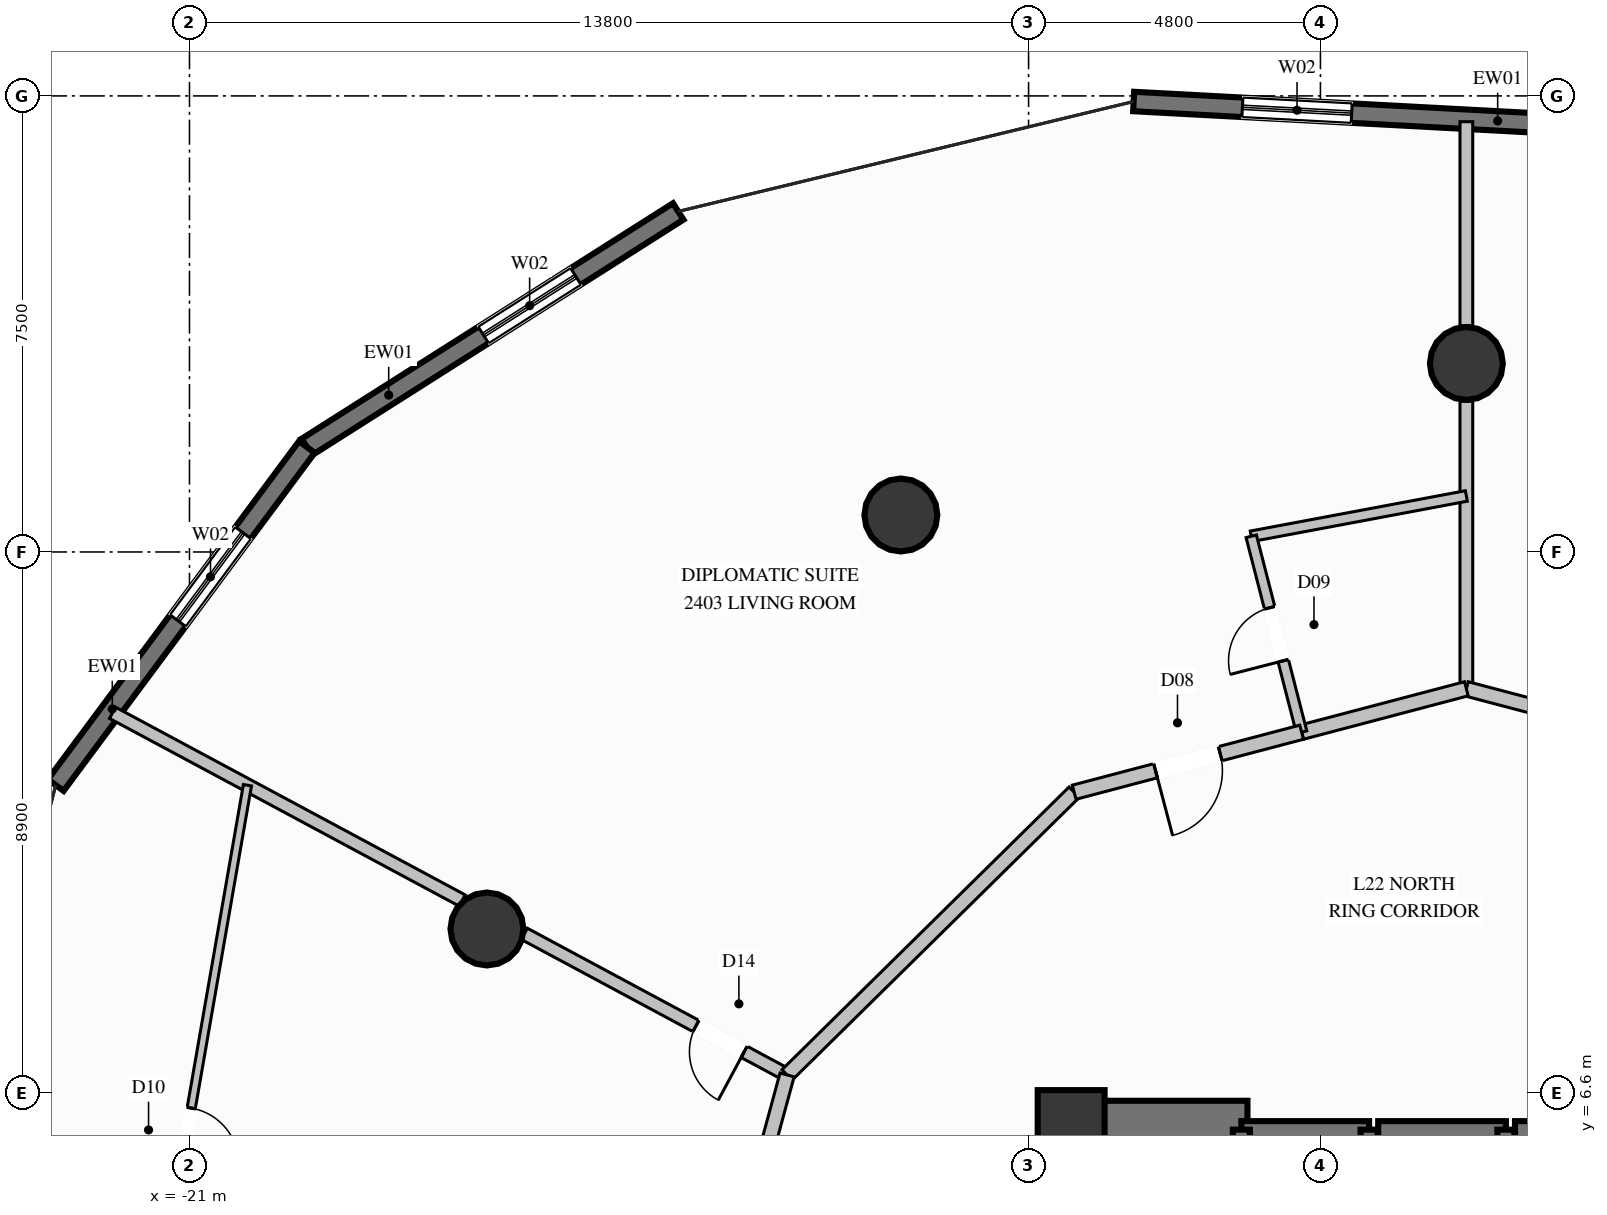
"""IFC4 building model, lengths in metres.
Left out: names, types, materials, properties, quantities, classifications, styles, units other than length and angle.
Written with IfcOpenShell. Run it as: python <this file> out.ifc"""

import sys

from ifc_helpers import new_model, si_unit, direction, frame, frame_2d, origin, origin_2d, place, context, subcontext, project, spatial, rectangle, circle, extrude, element, fill, save


model = new_model("IFC4")
c1 = context("Model", 3, precision=1e-05, world=origin(), true_north=direction((0.0, 1.0)))
c2 = subcontext(c1, "Body", "Model", "MODEL_VIEW")
j1 = project(units=[si_unit("LENGTHUNIT", "METRE"), si_unit("PLANEANGLEUNIT", "RADIAN")], contexts=[c1])
p1 = place(None, origin())
s1 = spatial("IfcSite", under=j1, at=p1, CompositionType="ELEMENT")
p2 = place(p1, origin())
s2 = spatial("IfcBuilding", under=s1, at=p2, CompositionType="ELEMENT")
p3 = place(p2, frame((0.0, 0.0, 89.6)))
s3 = spatial("IfcBuildingStorey", under=s2, at=p3, CompositionType="ELEMENT", Elevation=89.6)
p4 = place(p3, frame((-6.5, 6.1, 0.0), z_axis=(0.0, 0.0, 1.0), x_axis=(1.0, 0.0, 0.0)))
e1 = element("IfcColumn", 1, at=p4, inside=s3, PredefinedType="COLUMN", context=c2, shape_type="SweptSolid", body=[
    extrude(rectangle(XDim=1.1, YDim=1.1, at=origin_2d()), origin(), (0.0, 0.0, 1.0), 3.6),
])
p5 = place(p3, frame((-6.125, 6.1, 0.0), z_axis=(0.0, 0.0, 1.0), x_axis=(1.0, 0.0, 0.0)))
e2 = element("IfcWall", 2, at=p5, inside=s3, PredefinedType="SHEAR", context=c2, shape_type="SweptSolid", body=[
    extrude(rectangle(XDim=2.525, YDim=0.75, at=frame_2d((1.262, 0.0))), origin(), (0.0, 0.0, 1.0), 3.6),
])
p6 = place(p3, frame((-6.5, 2.35, 0.0), z_axis=(0.0, 0.0, 1.0), x_axis=(0.0, 1.0, 0.0)))
e3 = element("IfcWall", 3, at=p6, inside=s3, PredefinedType="SHEAR", context=c2, shape_type="SweptSolid", body=[
    extrude(rectangle(XDim=4.125, YDim=0.75, at=frame_2d((2.062, 0.0))), origin(), (0.0, 0.0, 1.0), 3.6),
])
for number, where, z_axis, x_axis in (
    (4, (0.0, 18.6, 0.0), (0.0, 0.0, 1.0), (1.0, 0.0, 0.0)),
    (5, (-9.3, 16.108, 0.0), (0.0, 0.0, 1.0), (1.0, 0.0, 0.0)),
    (6, (-16.108, 9.3, 0.0), (0.0, 0.0, 1.0), (1.0, 0.0, 0.0)),
):
    element("IfcColumn", number, at=place(p3, frame(where, z_axis=z_axis, x_axis=x_axis)), inside=s3, PredefinedType="COLUMN", context=c2, shape_type="SweptSolid", body=[
        extrude(circle(Radius=0.6, at=origin_2d()), origin(), (0.0, 0.0, 1.0), 3.6),
    ])
p7 = place(p3, frame((-5.472, 22.908, 0.0), z_axis=(0.0, 0.0, 1.0), x_axis=(0.998582015263, -0.053234939583, 0.0)))
e7 = element("IfcWall", 7, at=p7, inside=s3, PredefinedType="SOLIDWALL", context=c2, shape_type="SweptSolid", body=[
    extrude(rectangle(XDim=8.149, YDim=0.32, at=frame_2d((4.075, 0.0))), origin(), (0.0, 0.0, 1.0), 3.2),
])
p8 = place(p7, frame((1.791, 0.0, 0.35)))
e8 = element("IfcOpeningElement", 8, at=p8, cuts=e7, PredefinedType="OPENING", context=c2, shape_type="SweptSolid", body=[
    extrude(rectangle(XDim=1.8, YDim=2.6, at=frame_2d((0.9, 1.3))), frame((0.0, 0.17, 0.0), z_axis=(0.0, -1.0, 0.0), x_axis=(1.0, 0.0, 0.0)), (0.0, 0.0, 1.0), 0.34),
])
p9 = place(p3, frame((-19.07, 17.226, 0.0), z_axis=(0.0, 0.0, 1.0), x_axis=(0.844473577477, 0.535597215213, 0.0)))
e9 = element("IfcWall", 9, at=p9, inside=s3, PredefinedType="SOLIDWALL", context=c2, shape_type="SweptSolid", body=[
    extrude(rectangle(XDim=7.233, YDim=0.32, at=frame_2d((3.617, 0.0))), origin(), (0.0, 0.0, 1.0), 3.2),
])
p10 = place(p9, frame((3.439, 0.0, 0.35)))
e10 = element("IfcOpeningElement", 10, at=p10, cuts=e9, PredefinedType="OPENING", context=c2, shape_type="SweptSolid", body=[
    extrude(rectangle(XDim=1.8, YDim=2.6, at=frame_2d((0.9, 1.3))), frame((0.0, 0.17, 0.0), z_axis=(0.0, -1.0, 0.0), x_axis=(1.0, 0.0, 0.0)), (0.0, 0.0, 1.0), 0.34),
])
p11 = place(p3, frame((-23.199, 11.666, 0.0), z_axis=(0.0, 0.0, 1.0), x_axis=(0.596191587438, 0.80284219562, 0.0)))
e11 = element("IfcWall", 11, at=p11, inside=s3, PredefinedType="SOLIDWALL", context=c2, shape_type="SweptSolid", body=[
    extrude(rectangle(XDim=6.926, YDim=0.32, at=frame_2d((3.463, 0.0))), origin(), (0.0, 0.0, 1.0), 3.2),
])
p12 = place(p11, frame((3.368, 0.0, 0.35)))
e12 = element("IfcOpeningElement", 12, at=p12, cuts=e11, PredefinedType="OPENING", context=c2, shape_type="SweptSolid", body=[
    extrude(rectangle(XDim=1.8, YDim=2.6, at=frame_2d((0.9, 1.3))), frame((0.0, 0.17, 0.0), z_axis=(0.0, -1.0, 0.0), x_axis=(1.0, 0.0, 0.0)), (0.0, 0.0, 1.0), 0.34),
])
p13 = place(p3, frame((-1.6, 6.0, 0.0), z_axis=(0.0, 0.0, 1.0), x_axis=(-1.0, 0.0, 0.0)))
e13 = element("IfcWall", 13, at=p13, inside=s3, PredefinedType="SOLIDWALL", context=c2, shape_type="SweptSolid", body=[
    extrude(rectangle(XDim=2.1, YDim=0.28, at=frame_2d((1.05, 0.0))), origin(), (0.0, 0.0, 1.0), 3.2),
])
for number, where, z_axis, x_axis in (
    (14, (-3.7, 6.0, 0.0), (0.0, 0.0, 1.0), (0.0, -1.0, 0.0)),
    (15, (-1.6, 3.5, 0.0), (0.0, 0.0, 1.0), (0.0, 1.0, 0.0)),
):
    element("IfcWall", number, at=place(p3, frame(where, z_axis=z_axis, x_axis=x_axis)), inside=s3, PredefinedType="SOLIDWALL", context=c2, shape_type="SweptSolid", body=[
        extrude(rectangle(XDim=2.5, YDim=0.28, at=frame_2d((1.25, 0.0))), origin(), (0.0, 0.0, 1.0), 3.2),
    ])
p14 = place(p3, frame((0.65, 6.0, 0.0), z_axis=(0.0, 0.0, 1.0), x_axis=(-1.0, 0.0, 0.0)))
e16 = element("IfcWall", 16, at=p14, inside=s3, PredefinedType="SOLIDWALL", context=c2, shape_type="SweptSolid", body=[
    extrude(rectangle(XDim=2.1, YDim=0.28, at=frame_2d((1.05, 0.0))), origin(), (0.0, 0.0, 1.0), 3.2),
])
p15 = place(p3, frame((0.65, 3.5, 0.0), z_axis=(0.0, 0.0, 1.0), x_axis=(0.0, 1.0, 0.0)))
e17 = element("IfcWall", 17, at=p15, inside=s3, PredefinedType="SOLIDWALL", context=c2, shape_type="SweptSolid", body=[
    extrude(rectangle(XDim=2.5, YDim=0.28, at=frame_2d((1.25, 0.0))), origin(), (0.0, 0.0, 1.0), 3.2),
])
p16 = place(p3, frame((3.0, 6.0, 0.0), z_axis=(0.0, 0.0, 1.0), x_axis=(-1.0, 0.0, 0.0)))
e18 = element("IfcWall", 18, at=p16, inside=s3, PredefinedType="SOLIDWALL", context=c2, shape_type="SweptSolid", body=[
    extrude(rectangle(XDim=2.2, YDim=0.28, at=frame_2d((1.1, 0.0))), origin(), (0.0, 0.0, 1.0), 3.2),
])
p17 = place(p3, frame((0.0, 13.25, 0.0), z_axis=(0.0, 0.0, 1.0), x_axis=(0.0, 1.0, 0.0)))
e19 = element("IfcWall", 19, at=p17, inside=s3, PredefinedType="PARTITIONING", context=c2, shape_type="SweptSolid", body=[
    extrude(rectangle(XDim=4.73, YDim=0.21, at=frame_2d((2.365, 0.0))), origin(), (0.0, 0.0, 1.0), 2.067),
])
p18 = place(p3, frame((0.0, 19.22, 0.0), z_axis=(0.0, 0.0, 1.0), x_axis=(0.0, 1.0, 0.0)))
e20 = element("IfcWall", 20, at=p18, inside=s3, PredefinedType="PARTITIONING", context=c2, shape_type="SweptSolid", body=[
    extrude(rectangle(XDim=3.356, YDim=0.21, at=frame_2d((1.678, 0.0))), origin(), (0.0, 0.0, 1.0), 3.2),
])
p19 = place(p3, frame((-11.172, 6.9, 0.0), z_axis=(0.0, 0.0, 1.0), x_axis=(-0.881025167938, 0.473069396029, 0.0)))
e21 = element("IfcWall", 21, at=p19, inside=s3, PredefinedType="PARTITIONING", context=c2, shape_type="SweptSolid", body=[
    extrude(rectangle(XDim=4.904, YDim=0.21, at=frame_2d((2.452, 0.0))), origin(), (0.0, 0.0, 1.0), 2.067),
])
p20 = place(p19, frame((0.801, 0.0, 0.0)))
e22 = element("IfcOpeningElement", 22, at=p20, cuts=e21, PredefinedType="OPENING", context=c2, shape_type="SweptSolid", body=[
    extrude(rectangle(XDim=0.9, YDim=2.02, at=frame_2d((0.45, 1.01))), frame((0.0, 0.115, 0.0), z_axis=(0.0, -1.0, 0.0), x_axis=(1.0, 0.0, 0.0)), (0.0, 0.0, 1.0), 0.23),
])
p21 = place(p3, frame((-16.515, 9.768, 0.0), z_axis=(0.0, 0.0, 1.0), x_axis=(-0.881103250106, 0.472923950178, 0.0)))
e23 = element("IfcWall", 23, at=p21, inside=s3, PredefinedType="PARTITIONING", context=c2, shape_type="SweptSolid", body=[
    extrude(rectangle(XDim=6.527, YDim=0.21, at=frame_2d((3.264, 0.0))), origin(), (0.0, 0.0, 1.0), 3.2),
])
p22 = place(p3, frame((3.741, 12.263, 0.0), z_axis=(0.0, 0.0, 1.0), x_axis=(-0.966909222747, 0.255120667465, 0.0)))
e24 = element("IfcWall", 24, at=p22, inside=s3, PredefinedType="PARTITIONING", context=c2, shape_type="SweptSolid", body=[
    extrude(rectangle(XDim=3.869, YDim=0.24, at=frame_2d((1.935, 0.0))), origin(), (0.0, 0.0, 1.0), 3.2),
])
p23 = place(p22, frame((1.435, 0.0, 0.0)))
e25 = element("IfcOpeningElement", 25, at=p23, cuts=e24, PredefinedType="OPENING", context=c2, shape_type="SweptSolid", body=[
    extrude(rectangle(XDim=1.0, YDim=2.2, at=frame_2d((0.5, 1.1))), frame((0.0, 0.13, 0.0), z_axis=(0.0, -1.0, 0.0), x_axis=(1.0, 0.0, 0.0)), (0.0, 0.0, 1.0), 0.26),
])
p24 = place(p3, frame((0.0, 13.25, 0.0), z_axis=(0.0, 0.0, 1.0), x_axis=(-0.966967212689, -0.254900783806, 0.0)))
e26 = element("IfcWall", 26, at=p24, inside=s3, PredefinedType="PARTITIONING", context=c2, shape_type="SweptSolid", body=[
    extrude(rectangle(XDim=2.802, YDim=0.24, at=frame_2d((1.401, 0.0))), origin(), (0.0, 0.0, 1.0), 3.2),
])
p25 = place(p3, frame((0.0, 16.421, 0.0), z_axis=(0.0, 0.0, 1.0), x_axis=(-0.982899817201, -0.184141112593, 0.0)))
e27 = element("IfcWall", 27, at=p25, inside=s3, PredefinedType="PLUMBINGWALL", context=c2, shape_type="SweptSolid", body=[
    extrude(rectangle(XDim=3.6, YDim=0.175, at=frame_2d((1.8, 0.0))), origin(), (0.0, 0.0, 1.0), 3.2),
])
p26 = place(p3, frame((-2.709, 12.536, 0.0), z_axis=(0.0, 0.0, 1.0), x_axis=(-0.249194424237, 0.968453477938, 0.0)))
e28 = element("IfcWall", 28, at=p26, inside=s3, PredefinedType="PLUMBINGWALL", context=c2, shape_type="SweptSolid", body=[
    extrude(rectangle(XDim=3.327, YDim=0.175, at=frame_2d((1.664, 0.0))), origin(), (0.0, 0.0, 1.0), 3.2),
])
p27 = place(p26, frame((1.213, 0.0, 0.0)))
e29 = element("IfcOpeningElement", 29, at=p27, cuts=e28, PredefinedType="OPENING", context=c2, shape_type="SweptSolid", body=[
    extrude(rectangle(XDim=0.9, YDim=2.1, at=frame_2d((0.45, 1.05))), frame((0.0, 0.098, 0.0), z_axis=(0.0, -1.0, 0.0), x_axis=(1.0, 0.0, 0.0)), (0.0, 0.0, 1.0), 0.195),
])
p28 = place(p3, frame((-6.45, 11.549, 0.0), z_axis=(0.0, 0.0, 1.0), x_axis=(-0.712593171801, -0.701577487882, 0.0)))
e30 = element("IfcWall", 30, at=p28, inside=s3, PredefinedType="PARTITIONING", context=c2, shape_type="SweptSolid", body=[
    extrude(rectangle(XDim=6.627, YDim=0.24, at=frame_2d((3.313, 0.0))), origin(), (0.0, 0.0, 1.0), 3.2),
])
p29 = place(p3, frame((-2.709, 12.536, 0.0), z_axis=(0.0, 0.0, 1.0), x_axis=(-0.966924787062, -0.255061671298, 0.0)))
e31 = element("IfcWall", 31, at=p29, inside=s3, PredefinedType="PARTITIONING", context=c2, shape_type="SweptSolid", body=[
    extrude(rectangle(XDim=3.869, YDim=0.24, at=frame_2d((1.935, 0.0))), origin(), (0.0, 0.0, 1.0), 3.2),
])
p30 = place(p29, frame((1.385, 0.0, 0.0)))
e32 = element("IfcOpeningElement", 32, at=p30, cuts=e31, PredefinedType="OPENING", context=c2, shape_type="SweptSolid", body=[
    extrude(rectangle(XDim=1.1, YDim=2.3, at=frame_2d((0.55, 1.15))), frame((0.0, 0.13, 0.0), z_axis=(0.0, -1.0, 0.0), x_axis=(1.0, 0.0, 0.0)), (0.0, 0.0, 1.0), 0.26),
])
p31 = place(p3, frame((-11.172, 6.9, 0.0), z_axis=(0.0, 0.0, 1.0), x_axis=(-0.262552308576, -0.96491776088, 0.0)))
e33 = element("IfcWall", 33, at=p31, inside=s3, PredefinedType="PARTITIONING", context=c2, shape_type="SweptSolid", body=[
    extrude(rectangle(XDim=6.581, YDim=0.24, at=frame_2d((3.291, 0.0))), origin(), (0.0, 0.0, 1.0), 3.2),
])
p32 = place(p3, frame((-20.047, 11.664, 0.0), z_axis=(0.0, 0.0, 1.0), x_axis=(-0.171473832305, -0.985188674739, 0.0)))
e34 = element("IfcWall", 34, at=p32, inside=s3, PredefinedType="PARTITIONING", context=c2, shape_type="SweptSolid", body=[
    extrude(rectangle(XDim=11.728, YDim=0.135, at=frame_2d((5.864, 0.0))), origin(), (0.0, 0.0, 1.0), 3.2),
])
p33 = place(p32, frame((5.389, 0.0, 0.0)))
e35 = element("IfcOpeningElement", 35, at=p33, cuts=e34, PredefinedType="OPENING", context=c2, shape_type="SweptSolid", body=[
    extrude(rectangle(XDim=0.95, YDim=2.1, at=frame_2d((0.475, 1.05))), frame((0.0, 0.078, 0.0), z_axis=(0.0, -1.0, 0.0), x_axis=(1.0, 0.0, 0.0)), (0.0, 0.0, 1.0), 0.155),
])
p34 = place(p8, origin())
e36 = element("IfcWindow", 36, at=p34, inside=s3, PartitioningType="SINGLE_PANEL", PredefinedType="WINDOW", context=c2, shape_type="SweptSolid", body=[
    extrude(rectangle(XDim=1.8, YDim=2.6, at=frame_2d((0.9, 1.3))), frame((0.0, 0.03, 0.0), z_axis=(0.0, -1.0, 0.0), x_axis=(1.0, 0.0, 0.0)), (0.0, 0.0, 1.0), 0.06),
])
fill(e8, e36)
p35 = place(p10, origin())
e37 = element("IfcWindow", 37, at=p35, inside=s3, PartitioningType="SINGLE_PANEL", PredefinedType="WINDOW", context=c2, shape_type="SweptSolid", body=[
    extrude(rectangle(XDim=1.8, YDim=2.6, at=frame_2d((0.9, 1.3))), frame((0.0, 0.03, 0.0), z_axis=(0.0, -1.0, 0.0), x_axis=(1.0, 0.0, 0.0)), (0.0, 0.0, 1.0), 0.06),
])
fill(e10, e37)
p36 = place(p12, origin())
e38 = element("IfcWindow", 38, at=p36, inside=s3, PartitioningType="SINGLE_PANEL", PredefinedType="WINDOW", context=c2, shape_type="SweptSolid", body=[
    extrude(rectangle(XDim=1.8, YDim=2.6, at=frame_2d((0.9, 1.3))), frame((0.0, 0.03, 0.0), z_axis=(0.0, -1.0, 0.0), x_axis=(1.0, 0.0, 0.0)), (0.0, 0.0, 1.0), 0.06),
])
fill(e12, e38)
p37 = place(p27, origin())
e39 = element("IfcDoor", 39, at=p37, inside=s3, OperationType="SINGLE_SWING_LEFT", PredefinedType="DOOR", context=c2, shape_type="SweptSolid", body=[
    extrude(rectangle(XDim=0.9, YDim=2.1, at=frame_2d((0.45, 1.05))), frame((0.0, 0.025, 0.0), z_axis=(0.0, -1.0, 0.0), x_axis=(1.0, 0.0, 0.0)), (0.0, 0.0, 1.0), 0.05),
])
fill(e29, e39)
p38 = place(p30, origin())
e40 = element("IfcDoor", 40, at=p38, inside=s3, OperationType="SINGLE_SWING_RIGHT", PredefinedType="DOOR", context=c2, shape_type="SweptSolid", body=[
    extrude(rectangle(XDim=1.1, YDim=2.3, at=frame_2d((0.55, 1.15))), frame((0.0, 0.025, 0.0), z_axis=(0.0, -1.0, 0.0), x_axis=(1.0, 0.0, 0.0)), (0.0, 0.0, 1.0), 0.05),
])
fill(e32, e40)
p39 = place(p20, origin())
e41 = element("IfcDoor", 41, at=p39, inside=s3, OperationType="SINGLE_SWING_LEFT", PredefinedType="DOOR", context=c2, shape_type="SweptSolid", body=[
    extrude(rectangle(XDim=0.9, YDim=2.02, at=frame_2d((0.45, 1.01))), frame((0.0, 0.025, 0.0), z_axis=(0.0, -1.0, 0.0), x_axis=(1.0, 0.0, 0.0)), (0.0, 0.0, 1.0), 0.05),
])
fill(e22, e41)
p40 = place(p33, origin())
e42 = element("IfcDoor", 42, at=p40, inside=s3, OperationType="SINGLE_SWING_RIGHT", PredefinedType="DOOR", context=c2, shape_type="SweptSolid", body=[
    extrude(rectangle(XDim=0.95, YDim=2.1, at=frame_2d((0.475, 1.05))), frame((0.0, 0.025, 0.0), z_axis=(0.0, -1.0, 0.0), x_axis=(1.0, 0.0, 0.0)), (0.0, 0.0, 1.0), 0.05),
])
fill(e35, e42)
save(model, sys.argv[1])
